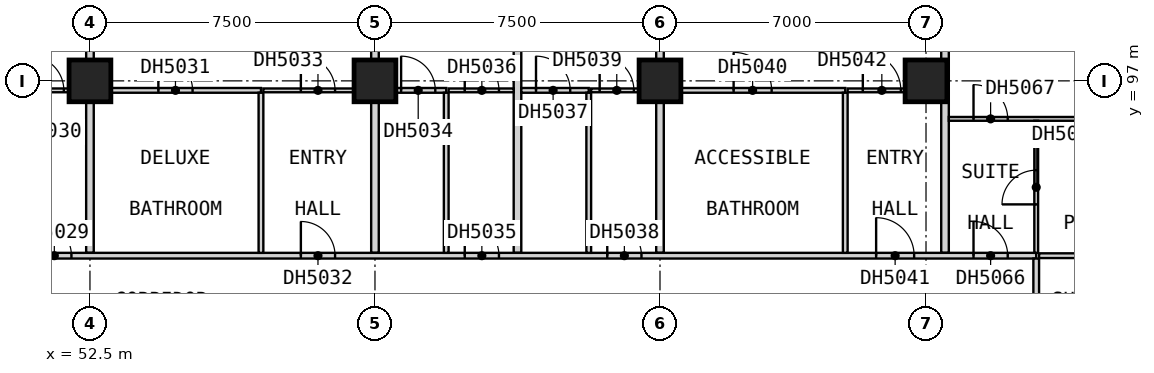
"""IFC4 building model, lengths in metres.
Left out: names, types, materials, properties, quantities, classifications, styles, units other than length and angle.
Written with IfcOpenShell. Run it as: python <this file> out.ifc"""

import sys

from ifc_helpers import new_model, si_unit, direction, frame, frame_2d, origin, origin_2d, place, context, subcontext, project, spatial, rectangle, extrude, element, fill, save


model = new_model("IFC4")
c1 = context("Model", 3, precision=1e-05, world=origin(), true_north=direction((0.0, 1.0)))
c2 = subcontext(c1, "Body", "Model", "MODEL_VIEW")
j1 = project(units=[si_unit("LENGTHUNIT", "METRE"), si_unit("PLANEANGLEUNIT", "RADIAN")], contexts=[c1])
p1 = place(None, origin())
s1 = spatial("IfcSite", under=j1, at=p1, CompositionType="ELEMENT")
p2 = place(p1, origin())
s2 = spatial("IfcBuilding", under=s1, at=p2, CompositionType="ELEMENT")
p3 = place(p2, frame((0.0, 0.0, 93.5)))
s3 = spatial("IfcBuildingStorey", under=s2, at=p3, CompositionType="ELEMENT", Elevation=93.5)
for number, where, z_axis, x_axis in (
    (1, (52.5, 97.0, 0.0), (0.0, 0.0, 1.0), (1.0, 0.0, 0.0)),
    (2, (60.0, 97.0, 0.0), (0.0, 0.0, 1.0), (1.0, 0.0, 0.0)),
    (3, (67.5, 97.0, 0.0), (0.0, 0.0, 1.0), (1.0, 0.0, 0.0)),
    (4, (74.5, 97.0, 0.0), (0.0, 0.0, 1.0), (1.0, 0.0, 0.0)),
):
    element("IfcColumn", number, at=place(p3, frame(where, z_axis=z_axis, x_axis=x_axis)), inside=s3, PredefinedType="COLUMN", context=c2, shape_type="SweptSolid", body=[
        extrude(rectangle(XDim=1.1, YDim=1.1, at=origin_2d()), origin(), (0.0, 0.0, 1.0), 3.6),
    ])
for number, where, z_axis, x_axis in (
    (5, (52.5, 92.475, 0.0), (0.0, 0.0, 1.0), (0.0, 1.0, 0.0)),
    (6, (60.0, 92.475, 0.0), (0.0, 0.0, 1.0), (0.0, 1.0, 0.0)),
):
    element("IfcWall", number, at=place(p3, frame(where, z_axis=z_axis, x_axis=x_axis)), inside=s3, PredefinedType="PARTITIONING", context=c2, shape_type="SweptSolid", body=[
        extrude(rectangle(XDim=12.525, YDim=0.2, at=frame_2d((6.262, 0.0))), origin(), (0.0, 0.0, 1.0), 3.35),
    ])
p4 = place(p3, frame((63.75, 92.475, 0.0), z_axis=(0.0, 0.0, 1.0), x_axis=(0.0, 1.0, 0.0)))
e7 = element("IfcWall", 7, at=p4, inside=s3, PredefinedType="PARTITIONING", context=c2, shape_type="SweptSolid", body=[
    extrude(rectangle(XDim=11.715, YDim=0.2, at=frame_2d((5.857, 0.0))), origin(), (0.0, 0.0, 1.0), 3.35),
])
p5 = place(p3, frame((67.5, 92.475, 0.0), z_axis=(0.0, 0.0, 1.0), x_axis=(0.0, 1.0, 0.0)))
e8 = element("IfcWall", 8, at=p5, inside=s3, PredefinedType="PARTITIONING", context=c2, shape_type="SweptSolid", body=[
    extrude(rectangle(XDim=12.525, YDim=0.2, at=frame_2d((6.262, 0.0))), origin(), (0.0, 0.0, 1.0), 3.35),
])
p6 = place(p3, frame((75.0, 92.475, 0.0), z_axis=(0.0, 0.0, 1.0), x_axis=(0.0, 1.0, 0.0)))
e9 = element("IfcWall", 9, at=p6, inside=s3, PredefinedType="PARTITIONING", context=c2, shape_type="SweptSolid", body=[
    extrude(rectangle(XDim=11.715, YDim=0.2, at=frame_2d((5.857, 0.0))), origin(), (0.0, 0.0, 1.0), 3.35),
])
p7 = place(p3, frame((33.75, 92.4, 0.0), z_axis=(0.0, 0.0, 1.0), x_axis=(1.0, 0.0, 0.0)))
e10 = element("IfcWall", 10, at=p7, inside=s3, PredefinedType="PARTITIONING", context=c2, shape_type="SweptSolid", body=[
    extrude(rectangle(XDim=43.65, YDim=0.15, at=frame_2d((21.825, 0.0))), origin(), (0.0, 0.0, 1.0), 3.35),
])
p8 = place(p7, frame((5.175, 0.0, 0.0)))
e11 = element("IfcOpeningElement", 11, at=p8, cuts=e10, PredefinedType="OPENING", context=c2, shape_type="SweptSolid", body=[
    extrude(rectangle(XDim=0.9, YDim=2.1, at=frame_2d((0.45, 1.05))), frame((0.0, 0.085, 0.0), z_axis=(0.0, -1.0, 0.0), x_axis=(1.0, 0.0, 0.0)), (0.0, 0.0, 1.0), 0.17),
])
p9 = place(p7, frame((13.05, 0.0, 0.0)))
e12 = element("IfcOpeningElement", 12, at=p9, cuts=e10, PredefinedType="OPENING", context=c2, shape_type="SweptSolid", body=[
    extrude(rectangle(XDim=0.9, YDim=2.1, at=frame_2d((0.45, 1.05))), frame((0.0, 0.085, 0.0), z_axis=(0.0, -1.0, 0.0), x_axis=(1.0, 0.0, 0.0)), (0.0, 0.0, 1.0), 0.17),
])
p10 = place(p7, frame((17.363, 0.0, 0.0)))
e13 = element("IfcOpeningElement", 13, at=p10, cuts=e10, PredefinedType="OPENING", context=c2, shape_type="SweptSolid", body=[
    extrude(rectangle(XDim=0.9, YDim=2.1, at=frame_2d((0.45, 1.05))), frame((0.0, 0.085, 0.0), z_axis=(0.0, -1.0, 0.0), x_axis=(1.0, 0.0, 0.0)), (0.0, 0.0, 1.0), 0.17),
])
p11 = place(p7, frame((24.3, 0.0, 0.0)))
e14 = element("IfcOpeningElement", 14, at=p11, cuts=e10, PredefinedType="OPENING", context=c2, shape_type="SweptSolid", body=[
    extrude(rectangle(XDim=0.9, YDim=2.1, at=frame_2d((0.45, 1.05))), frame((0.0, 0.085, 0.0), z_axis=(0.0, -1.0, 0.0), x_axis=(1.0, 0.0, 0.0)), (0.0, 0.0, 1.0), 0.17),
])
p12 = place(p7, frame((28.613, 0.0, 0.0)))
e15 = element("IfcOpeningElement", 15, at=p12, cuts=e10, PredefinedType="OPENING", context=c2, shape_type="SweptSolid", body=[
    extrude(rectangle(XDim=0.9, YDim=2.1, at=frame_2d((0.45, 1.05))), frame((0.0, 0.085, 0.0), z_axis=(0.0, -1.0, 0.0), x_axis=(1.0, 0.0, 0.0)), (0.0, 0.0, 1.0), 0.17),
])
p13 = place(p7, frame((32.363, 0.0, 0.0)))
e16 = element("IfcOpeningElement", 16, at=p13, cuts=e10, PredefinedType="OPENING", context=c2, shape_type="SweptSolid", body=[
    extrude(rectangle(XDim=0.9, YDim=2.1, at=frame_2d((0.45, 1.05))), frame((0.0, 0.085, 0.0), z_axis=(0.0, -1.0, 0.0), x_axis=(1.0, 0.0, 0.0)), (0.0, 0.0, 1.0), 0.17),
])
p14 = place(p7, frame((39.438, 0.0, 0.0)))
e17 = element("IfcOpeningElement", 17, at=p14, cuts=e10, PredefinedType="OPENING", context=c2, shape_type="SweptSolid", body=[
    extrude(rectangle(XDim=1.0, YDim=2.1, at=frame_2d((0.5, 1.05))), frame((0.0, 0.085, 0.0), z_axis=(0.0, -1.0, 0.0), x_axis=(1.0, 0.0, 0.0)), (0.0, 0.0, 1.0), 0.17),
])
p15 = place(p7, frame((42.0, 0.0, 0.0)))
e18 = element("IfcOpeningElement", 18, at=p15, cuts=e10, PredefinedType="OPENING", context=c2, shape_type="SweptSolid", body=[
    extrude(rectangle(XDim=0.9, YDim=2.1, at=frame_2d((0.45, 1.05))), frame((0.0, 0.085, 0.0), z_axis=(0.0, -1.0, 0.0), x_axis=(1.0, 0.0, 0.0)), (0.0, 0.0, 1.0), 0.17),
])
p16 = place(p3, frame((77.4, 50.175, 0.0), z_axis=(0.0, 0.0, 1.0), x_axis=(0.0, 1.0, 0.0)))
e19 = element("IfcWall", 19, at=p16, inside=s3, PredefinedType="PARTITIONING", context=c2, shape_type="SweptSolid", body=[
    extrude(rectangle(XDim=42.15, YDim=0.15, at=frame_2d((21.075, 0.0))), origin(), (0.0, 0.0, 1.0), 3.35),
])
p17 = place(p16, frame((4.125, 0.0, 0.0)))
e20 = element("IfcOpeningElement", 20, at=p17, cuts=e19, PredefinedType="OPENING", context=c2, shape_type="SweptSolid", body=[
    extrude(rectangle(XDim=0.9, YDim=2.1, at=frame_2d((0.45, 1.05))), frame((0.0, 0.085, 0.0), z_axis=(0.0, -1.0, 0.0), x_axis=(1.0, 0.0, 0.0)), (0.0, 0.0, 1.0), 0.17),
])
p18 = place(p16, frame((19.125, 0.0, 0.0)))
e21 = element("IfcOpeningElement", 21, at=p18, cuts=e19, PredefinedType="OPENING", context=c2, shape_type="SweptSolid", body=[
    extrude(rectangle(XDim=0.9, YDim=2.1, at=frame_2d((0.45, 1.05))), frame((0.0, 0.085, 0.0), z_axis=(0.0, -1.0, 0.0), x_axis=(1.0, 0.0, 0.0)), (0.0, 0.0, 1.0), 0.17),
])
p19 = place(p16, frame((26.625, 0.0, 0.0)))
e22 = element("IfcOpeningElement", 22, at=p19, cuts=e19, PredefinedType="OPENING", context=c2, shape_type="SweptSolid", body=[
    extrude(rectangle(XDim=0.9, YDim=2.1, at=frame_2d((0.45, 1.05))), frame((0.0, 0.085, 0.0), z_axis=(0.0, -1.0, 0.0), x_axis=(1.0, 0.0, 0.0)), (0.0, 0.0, 1.0), 0.17),
])
p20 = place(p16, frame((30.938, 0.0, 0.0)))
e23 = element("IfcOpeningElement", 23, at=p20, cuts=e19, PredefinedType="OPENING", context=c2, shape_type="SweptSolid", body=[
    extrude(rectangle(XDim=0.9, YDim=2.1, at=frame_2d((0.45, 1.05))), frame((0.0, 0.085, 0.0), z_axis=(0.0, -1.0, 0.0), x_axis=(1.0, 0.0, 0.0)), (0.0, 0.0, 1.0), 0.17),
])
p21 = place(p16, frame((38.012, 0.0, 0.0)))
e24 = element("IfcOpeningElement", 24, at=p21, cuts=e19, PredefinedType="OPENING", context=c2, shape_type="SweptSolid", body=[
    extrude(rectangle(XDim=1.0, YDim=2.1, at=frame_2d((0.5, 1.05))), frame((0.0, 0.085, 0.0), z_axis=(0.0, -1.0, 0.0), x_axis=(1.0, 0.0, 0.0)), (0.0, 0.0, 1.0), 0.17),
])
p22 = place(p3, frame((75.1, 96.0, 0.0), z_axis=(0.0, 0.0, 1.0), x_axis=(1.0, 0.0, 0.0)))
e25 = element("IfcWall", 25, at=p22, inside=s3, PredefinedType="PARTITIONING", context=c2, shape_type="SweptSolid", body=[
    extrude(rectangle(XDim=7.35, YDim=0.1, at=frame_2d((3.675, 0.0))), origin(), (0.0, 0.0, 1.0), 3.35),
])
p23 = place(p22, frame((0.65, 0.0, 0.0)))
e26 = element("IfcOpeningElement", 26, at=p23, cuts=e25, PredefinedType="OPENING", context=c2, shape_type="SweptSolid", body=[
    extrude(rectangle(XDim=0.9, YDim=2.1, at=frame_2d((0.45, 1.05))), frame((0.0, 0.06, 0.0), z_axis=(0.0, -1.0, 0.0), x_axis=(1.0, 0.0, 0.0)), (0.0, 0.0, 1.0), 0.12),
])
p24 = place(p3, frame((50.688, 96.75, 0.0), z_axis=(0.0, 0.0, 1.0), x_axis=(1.0, 0.0, 0.0)))
e27 = element("IfcWall", 27, at=p24, inside=s3, PredefinedType="PARTITIONING", context=c2, shape_type="SweptSolid", body=[
    extrude(rectangle(XDim=1.712, YDim=0.1, at=frame_2d((0.856, 0.0))), origin(), (0.0, 0.0, 1.0), 3.35),
])
p25 = place(p24, frame((0.225, 0.0, 0.0)))
e28 = element("IfcOpeningElement", 28, at=p25, cuts=e27, PredefinedType="OPENING", context=c2, shape_type="SweptSolid", body=[
    extrude(rectangle(XDim=0.9, YDim=2.1, at=frame_2d((0.45, 1.05))), frame((0.0, 0.06, 0.0), z_axis=(0.0, -1.0, 0.0), x_axis=(1.0, 0.0, 0.0)), (0.0, 0.0, 1.0), 0.12),
])
p26 = place(p3, frame((57.062, 96.75, 0.0), z_axis=(0.0, 0.0, 1.0), x_axis=(1.0, 0.0, 0.0)))
e29 = element("IfcWall", 29, at=p26, inside=s3, PredefinedType="PARTITIONING", context=c2, shape_type="SweptSolid", body=[
    extrude(rectangle(XDim=2.837, YDim=0.1, at=frame_2d((1.419, 0.0))), origin(), (0.0, 0.0, 1.0), 3.35),
])
p27 = place(p26, frame((0.988, 0.0, 0.0)))
e30 = element("IfcOpeningElement", 30, at=p27, cuts=e29, PredefinedType="OPENING", context=c2, shape_type="SweptSolid", body=[
    extrude(rectangle(XDim=0.9, YDim=2.1, at=frame_2d((0.45, 1.05))), frame((0.0, 0.06, 0.0), z_axis=(0.0, -1.0, 0.0), x_axis=(1.0, 0.0, 0.0)), (0.0, 0.0, 1.0), 0.12),
])
p28 = place(p3, frame((61.938, 96.75, 0.0), z_axis=(0.0, 0.0, 1.0), x_axis=(1.0, 0.0, 0.0)))
e31 = element("IfcWall", 31, at=p28, inside=s3, PredefinedType="PARTITIONING", context=c2, shape_type="SweptSolid", body=[
    extrude(rectangle(XDim=1.712, YDim=0.1, at=frame_2d((0.856, 0.0))), origin(), (0.0, 0.0, 1.0), 3.35),
])
p29 = place(p28, frame((0.425, 0.0, 0.0)))
e32 = element("IfcOpeningElement", 32, at=p29, cuts=e31, PredefinedType="OPENING", context=c2, shape_type="SweptSolid", body=[
    extrude(rectangle(XDim=0.9, YDim=2.1, at=frame_2d((0.45, 1.05))), frame((0.0, 0.06, 0.0), z_axis=(0.0, -1.0, 0.0), x_axis=(1.0, 0.0, 0.0)), (0.0, 0.0, 1.0), 0.12),
])
p30 = place(p3, frame((65.688, 96.75, 0.0), z_axis=(0.0, 0.0, 1.0), x_axis=(1.0, 0.0, 0.0)))
e33 = element("IfcWall", 33, at=p30, inside=s3, PredefinedType="PARTITIONING", context=c2, shape_type="SweptSolid", body=[
    extrude(rectangle(XDim=1.712, YDim=0.1, at=frame_2d((0.856, 0.0))), origin(), (0.0, 0.0, 1.0), 3.35),
])
p31 = place(p30, frame((0.225, 0.0, 0.0)))
e34 = element("IfcOpeningElement", 34, at=p31, cuts=e33, PredefinedType="OPENING", context=c2, shape_type="SweptSolid", body=[
    extrude(rectangle(XDim=0.9, YDim=2.1, at=frame_2d((0.45, 1.05))), frame((0.0, 0.06, 0.0), z_axis=(0.0, -1.0, 0.0), x_axis=(1.0, 0.0, 0.0)), (0.0, 0.0, 1.0), 0.12),
])
p32 = place(p3, frame((72.438, 96.75, 0.0), z_axis=(0.0, 0.0, 1.0), x_axis=(1.0, 0.0, 0.0)))
e35 = element("IfcWall", 35, at=p32, inside=s3, PredefinedType="PARTITIONING", context=c2, shape_type="SweptSolid", body=[
    extrude(rectangle(XDim=2.462, YDim=0.1, at=frame_2d((1.231, 0.0))), origin(), (0.0, 0.0, 1.0), 3.35),
])
p33 = place(p32, frame((0.4, 0.0, 0.0)))
e36 = element("IfcOpeningElement", 36, at=p33, cuts=e35, PredefinedType="OPENING", context=c2, shape_type="SweptSolid", body=[
    extrude(rectangle(XDim=1.0, YDim=2.1, at=frame_2d((0.5, 1.05))), frame((0.0, 0.06, 0.0), z_axis=(0.0, -1.0, 0.0), x_axis=(1.0, 0.0, 0.0)), (0.0, 0.0, 1.0), 0.12),
])
p34 = place(p3, frame((77.4, 92.475, 0.0), z_axis=(0.0, 0.0, 1.0), x_axis=(0.0, 1.0, 0.0)))
e37 = element("IfcWall", 37, at=p34, inside=s3, PredefinedType="PARTITIONING", context=c2, shape_type="SweptSolid", body=[
    extrude(rectangle(XDim=3.475, YDim=0.1, at=frame_2d((1.737, 0.0))), origin(), (0.0, 0.0, 1.0), 3.35),
])
p35 = place(p34, frame((1.275, 0.0, 0.0)))
e38 = element("IfcOpeningElement", 38, at=p35, cuts=e37, PredefinedType="OPENING", context=c2, shape_type="SweptSolid", body=[
    extrude(rectangle(XDim=0.9, YDim=2.1, at=frame_2d((0.45, 1.05))), frame((0.0, 0.06, 0.0), z_axis=(0.0, -1.0, 0.0), x_axis=(1.0, 0.0, 0.0)), (0.0, 0.0, 1.0), 0.12),
])
p36 = place(p3, frame((77.475, 92.4, 0.0), z_axis=(0.0, 0.0, 1.0), x_axis=(1.0, 0.0, 0.0)))
e39 = element("IfcWall", 39, at=p36, inside=s3, PredefinedType="PARTITIONING", context=c2, shape_type="SweptSolid", body=[
    extrude(rectangle(XDim=5.025, YDim=0.125, at=frame_2d((2.512, 0.0))), origin(), (0.0, 0.0, 1.0), 3.35),
])
p37 = place(p3, frame((52.6, 96.75, 0.0), z_axis=(0.0, 0.0, 1.0), x_axis=(1.0, 0.0, 0.0)))
e40 = element("IfcWall", 40, at=p37, inside=s3, PredefinedType="PARTITIONING", context=c2, shape_type="SweptSolid", body=[
    extrude(rectangle(XDim=4.4, YDim=0.125, at=frame_2d((2.2, 0.0))), origin(), (0.0, 0.0, 1.0), 3.35),
])
p38 = place(p37, frame((1.7, 0.0, 0.0)))
e41 = element("IfcOpeningElement", 41, at=p38, cuts=e40, PredefinedType="OPENING", context=c2, shape_type="SweptSolid", body=[
    extrude(rectangle(XDim=0.9, YDim=2.1, at=frame_2d((0.45, 1.05))), frame((0.0, 0.073, 0.0), z_axis=(0.0, -1.0, 0.0), x_axis=(1.0, 0.0, 0.0)), (0.0, 0.0, 1.0), 0.145),
])
p39 = place(p3, frame((60.1, 96.75, 0.0), z_axis=(0.0, 0.0, 1.0), x_axis=(1.0, 0.0, 0.0)))
e42 = element("IfcWall", 42, at=p39, inside=s3, PredefinedType="PARTITIONING", context=c2, shape_type="SweptSolid", body=[
    extrude(rectangle(XDim=1.775, YDim=0.125, at=frame_2d((0.887, 0.0))), origin(), (0.0, 0.0, 1.0), 3.35),
])
p40 = place(p39, frame((0.587, 0.0, 0.0)))
e43 = element("IfcOpeningElement", 43, at=p40, cuts=e42, PredefinedType="OPENING", context=c2, shape_type="SweptSolid", body=[
    extrude(rectangle(XDim=0.9, YDim=2.1, at=frame_2d((0.45, 1.05))), frame((0.0, 0.073, 0.0), z_axis=(0.0, -1.0, 0.0), x_axis=(1.0, 0.0, 0.0)), (0.0, 0.0, 1.0), 0.145),
])
p41 = place(p3, frame((63.85, 96.75, 0.0), z_axis=(0.0, 0.0, 1.0), x_axis=(1.0, 0.0, 0.0)))
e44 = element("IfcWall", 44, at=p41, inside=s3, PredefinedType="PARTITIONING", context=c2, shape_type="SweptSolid", body=[
    extrude(rectangle(XDim=1.775, YDim=0.125, at=frame_2d((0.887, 0.0))), origin(), (0.0, 0.0, 1.0), 3.35),
])
p42 = place(p41, frame((0.387, 0.0, 0.0)))
e45 = element("IfcOpeningElement", 45, at=p42, cuts=e44, PredefinedType="OPENING", context=c2, shape_type="SweptSolid", body=[
    extrude(rectangle(XDim=0.9, YDim=2.1, at=frame_2d((0.45, 1.05))), frame((0.0, 0.073, 0.0), z_axis=(0.0, -1.0, 0.0), x_axis=(1.0, 0.0, 0.0)), (0.0, 0.0, 1.0), 0.145),
])
p43 = place(p3, frame((67.6, 96.75, 0.0), z_axis=(0.0, 0.0, 1.0), x_axis=(1.0, 0.0, 0.0)))
e46 = element("IfcWall", 46, at=p43, inside=s3, PredefinedType="PARTITIONING", context=c2, shape_type="SweptSolid", body=[
    extrude(rectangle(XDim=4.775, YDim=0.125, at=frame_2d((2.387, 0.0))), origin(), (0.0, 0.0, 1.0), 3.35),
])
p44 = place(p43, frame((1.837, 0.0, 0.0)))
e47 = element("IfcOpeningElement", 47, at=p44, cuts=e46, PredefinedType="OPENING", context=c2, shape_type="SweptSolid", body=[
    extrude(rectangle(XDim=1.0, YDim=2.1, at=frame_2d((0.5, 1.05))), frame((0.0, 0.073, 0.0), z_axis=(0.0, -1.0, 0.0), x_axis=(1.0, 0.0, 0.0)), (0.0, 0.0, 1.0), 0.145),
])
for number, where, z_axis, x_axis in (
    (48, (57.0, 92.475, 0.0), (0.0, 0.0, 1.0), (0.0, 1.0, 0.0)),
    (49, (61.875, 92.475, 0.0), (0.0, 0.0, 1.0), (0.0, 1.0, 0.0)),
    (50, (65.625, 92.475, 0.0), (0.0, 0.0, 1.0), (0.0, 1.0, 0.0)),
    (51, (72.375, 92.475, 0.0), (0.0, 0.0, 1.0), (0.0, 1.0, 0.0)),
):
    element("IfcWall", number, at=place(p3, frame(where, z_axis=z_axis, x_axis=x_axis)), inside=s3, PredefinedType="PARTITIONING", context=c2, shape_type="SweptSolid", body=[
        extrude(rectangle(XDim=4.212, YDim=0.125, at=frame_2d((2.106, 0.0))), origin(), (0.0, 0.0, 1.0), 3.35),
    ])
p45 = place(p10, origin())
e52 = element("IfcDoor", 52, at=p45, inside=s3, OperationType="SINGLE_SWING_LEFT", PredefinedType="DOOR", context=c2, shape_type="SweptSolid", body=[
    extrude(rectangle(XDim=0.9, YDim=2.1, at=frame_2d((0.45, 1.05))), frame((0.0, 0.025, 0.0), z_axis=(0.0, -1.0, 0.0), x_axis=(1.0, 0.0, 0.0)), (0.0, 0.0, 1.0), 0.05),
])
fill(e13, e52)
p46 = place(p25, origin())
e53 = element("IfcDoor", 53, at=p46, inside=s3, OperationType="SINGLE_SWING_RIGHT", PredefinedType="DOOR", context=c2, shape_type="SweptSolid", body=[
    extrude(rectangle(XDim=0.9, YDim=2.1, at=frame_2d((0.45, 1.05))), frame((0.0, 0.025, 0.0), z_axis=(0.0, -1.0, 0.0), x_axis=(1.0, 0.0, 0.0)), (0.0, 0.0, 1.0), 0.05),
])
fill(e28, e53)
p47 = place(p38, origin())
e54 = element("IfcDoor", 54, at=p47, inside=s3, OperationType="SINGLE_SWING_RIGHT", PredefinedType="DOOR", context=c2, shape_type="SweptSolid", body=[
    extrude(rectangle(XDim=0.9, YDim=2.1, at=frame_2d((0.45, 1.05))), frame((0.0, 0.025, 0.0), z_axis=(0.0, -1.0, 0.0), x_axis=(1.0, 0.0, 0.0)), (0.0, 0.0, 1.0), 0.05),
])
fill(e41, e54)
p48 = place(p11, origin())
e55 = element("IfcDoor", 55, at=p48, inside=s3, OperationType="SINGLE_SWING_LEFT", PredefinedType="DOOR", context=c2, shape_type="SweptSolid", body=[
    extrude(rectangle(XDim=0.9, YDim=2.1, at=frame_2d((0.45, 1.05))), frame((0.0, 0.025, 0.0), z_axis=(0.0, -1.0, 0.0), x_axis=(1.0, 0.0, 0.0)), (0.0, 0.0, 1.0), 0.05),
])
fill(e14, e55)
p49 = place(p27, origin())
e56 = element("IfcDoor", 56, at=p49, inside=s3, OperationType="SINGLE_SWING_RIGHT", PredefinedType="DOOR", context=c2, shape_type="SweptSolid", body=[
    extrude(rectangle(XDim=0.9, YDim=2.1, at=frame_2d((0.45, 1.05))), frame((0.0, 0.025, 0.0), z_axis=(0.0, -1.0, 0.0), x_axis=(1.0, 0.0, 0.0)), (0.0, 0.0, 1.0), 0.05),
])
fill(e30, e56)
p50 = place(p40, origin())
e57 = element("IfcDoor", 57, at=p50, inside=s3, OperationType="SINGLE_SWING_LEFT", PredefinedType="DOOR", context=c2, shape_type="SweptSolid", body=[
    extrude(rectangle(XDim=0.9, YDim=2.1, at=frame_2d((0.45, 1.05))), frame((0.0, 0.025, 0.0), z_axis=(0.0, -1.0, 0.0), x_axis=(1.0, 0.0, 0.0)), (0.0, 0.0, 1.0), 0.05),
])
fill(e43, e57)
p51 = place(p12, origin())
e58 = element("IfcDoor", 58, at=p51, inside=s3, OperationType="SINGLE_SWING_LEFT", PredefinedType="DOOR", context=c2, shape_type="SweptSolid", body=[
    extrude(rectangle(XDim=0.9, YDim=2.1, at=frame_2d((0.45, 1.05))), frame((0.0, 0.025, 0.0), z_axis=(0.0, -1.0, 0.0), x_axis=(1.0, 0.0, 0.0)), (0.0, 0.0, 1.0), 0.05),
])
fill(e15, e58)
p52 = place(p29, origin())
e59 = element("IfcDoor", 59, at=p52, inside=s3, OperationType="SINGLE_SWING_RIGHT", PredefinedType="DOOR", context=c2, shape_type="SweptSolid", body=[
    extrude(rectangle(XDim=0.9, YDim=2.1, at=frame_2d((0.45, 1.05))), frame((0.0, 0.025, 0.0), z_axis=(0.0, -1.0, 0.0), x_axis=(1.0, 0.0, 0.0)), (0.0, 0.0, 1.0), 0.05),
])
fill(e32, e59)
p53 = place(p42, origin())
e60 = element("IfcDoor", 60, at=p53, inside=s3, OperationType="SINGLE_SWING_RIGHT", PredefinedType="DOOR", context=c2, shape_type="SweptSolid", body=[
    extrude(rectangle(XDim=0.9, YDim=2.1, at=frame_2d((0.45, 1.05))), frame((0.0, 0.025, 0.0), z_axis=(0.0, -1.0, 0.0), x_axis=(1.0, 0.0, 0.0)), (0.0, 0.0, 1.0), 0.05),
])
fill(e45, e60)
p54 = place(p13, origin())
e61 = element("IfcDoor", 61, at=p54, inside=s3, OperationType="SINGLE_SWING_LEFT", PredefinedType="DOOR", context=c2, shape_type="SweptSolid", body=[
    extrude(rectangle(XDim=0.9, YDim=2.1, at=frame_2d((0.45, 1.05))), frame((0.0, 0.025, 0.0), z_axis=(0.0, -1.0, 0.0), x_axis=(1.0, 0.0, 0.0)), (0.0, 0.0, 1.0), 0.05),
])
fill(e16, e61)
p55 = place(p31, origin())
e62 = element("IfcDoor", 62, at=p55, inside=s3, OperationType="SINGLE_SWING_RIGHT", PredefinedType="DOOR", context=c2, shape_type="SweptSolid", body=[
    extrude(rectangle(XDim=0.9, YDim=2.1, at=frame_2d((0.45, 1.05))), frame((0.0, 0.025, 0.0), z_axis=(0.0, -1.0, 0.0), x_axis=(1.0, 0.0, 0.0)), (0.0, 0.0, 1.0), 0.05),
])
fill(e34, e62)
p56 = place(p44, origin())
e63 = element("IfcDoor", 63, at=p56, inside=s3, OperationType="SINGLE_SWING_RIGHT", PredefinedType="DOOR", context=c2, shape_type="SweptSolid", body=[
    extrude(rectangle(XDim=1.0, YDim=2.1, at=frame_2d((0.5, 1.05))), frame((0.0, 0.025, 0.0), z_axis=(0.0, -1.0, 0.0), x_axis=(1.0, 0.0, 0.0)), (0.0, 0.0, 1.0), 0.05),
])
fill(e47, e63)
p57 = place(p14, origin())
e64 = element("IfcDoor", 64, at=p57, inside=s3, OperationType="SINGLE_SWING_LEFT", PredefinedType="DOOR", context=c2, shape_type="SweptSolid", body=[
    extrude(rectangle(XDim=1.0, YDim=2.1, at=frame_2d((0.5, 1.05))), frame((0.0, 0.025, 0.0), z_axis=(0.0, -1.0, 0.0), x_axis=(1.0, 0.0, 0.0)), (0.0, 0.0, 1.0), 0.05),
])
fill(e17, e64)
p58 = place(p33, origin())
e65 = element("IfcDoor", 65, at=p58, inside=s3, OperationType="SINGLE_SWING_RIGHT", PredefinedType="DOOR", context=c2, shape_type="SweptSolid", body=[
    extrude(rectangle(XDim=1.0, YDim=2.1, at=frame_2d((0.5, 1.05))), frame((0.0, 0.025, 0.0), z_axis=(0.0, -1.0, 0.0), x_axis=(1.0, 0.0, 0.0)), (0.0, 0.0, 1.0), 0.05),
])
fill(e36, e65)
p59 = place(p15, origin())
e66 = element("IfcDoor", 66, at=p59, inside=s3, OperationType="SINGLE_SWING_RIGHT", PredefinedType="DOOR", context=c2, shape_type="SweptSolid", body=[
    extrude(rectangle(XDim=0.9, YDim=2.1, at=frame_2d((0.45, 1.05))), frame((0.0, 0.025, 0.0), z_axis=(0.0, -1.0, 0.0), x_axis=(1.0, 0.0, 0.0)), (0.0, 0.0, 1.0), 0.05),
])
fill(e18, e66)
p60 = place(p23, origin())
e67 = element("IfcDoor", 67, at=p60, inside=s3, OperationType="SINGLE_SWING_LEFT", PredefinedType="DOOR", context=c2, shape_type="SweptSolid", body=[
    extrude(rectangle(XDim=0.9, YDim=2.1, at=frame_2d((0.45, 1.05))), frame((0.0, 0.025, 0.0), z_axis=(0.0, -1.0, 0.0), x_axis=(1.0, 0.0, 0.0)), (0.0, 0.0, 1.0), 0.05),
])
fill(e26, e67)
p61 = place(p35, origin())
e68 = element("IfcDoor", 68, at=p61, inside=s3, OperationType="SINGLE_SWING_RIGHT", PredefinedType="DOOR", context=c2, shape_type="SweptSolid", body=[
    extrude(rectangle(XDim=0.9, YDim=2.1, at=frame_2d((0.45, 1.05))), frame((0.0, 0.025, 0.0), z_axis=(0.0, -1.0, 0.0), x_axis=(1.0, 0.0, 0.0)), (0.0, 0.0, 1.0), 0.05),
])
fill(e38, e68)
save(model, sys.argv[1])
